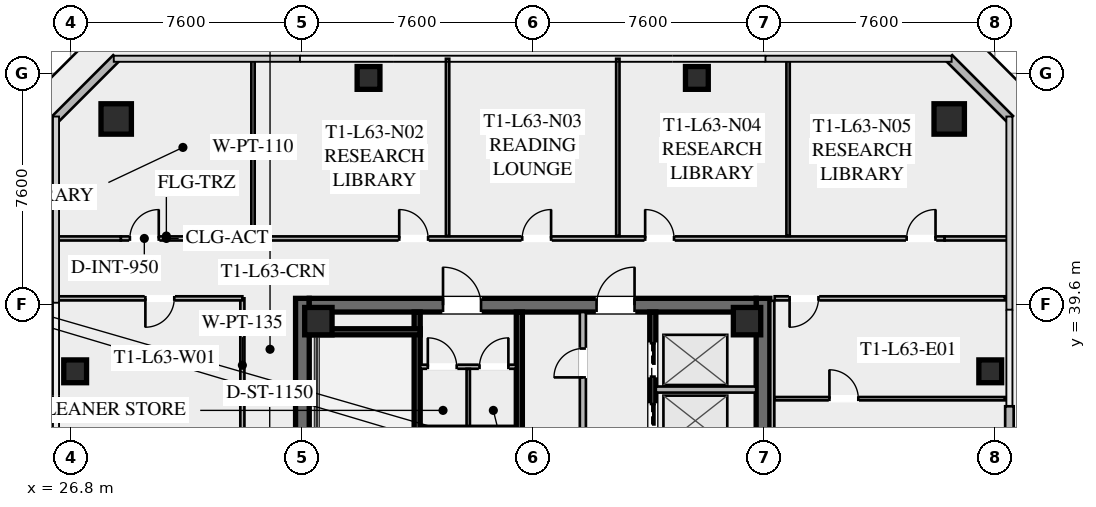
"""IFC4 building model, lengths in metres.
Left out: names, types, materials, properties, quantities, classifications, styles, units other than length and angle.
Written with IfcOpenShell. Run it as: python <this file> out.ifc"""

import sys

from ifc_helpers import new_model, si_unit, direction, frame, frame_2d, origin, origin_2d, place, context, subcontext, project, spatial, rectangle, hollow_rectangle, extrude, element, fill, save


model = new_model("IFC4")
c1 = context("Model", 3, precision=1e-05, world=origin(), true_north=direction((0.0, 1.0)))
c2 = subcontext(c1, "Body", "Model", "MODEL_VIEW")
j1 = project(units=[si_unit("LENGTHUNIT", "METRE"), si_unit("PLANEANGLEUNIT", "RADIAN")], contexts=[c1])
p1 = place(None, origin())
s1 = spatial("IfcSite", under=j1, at=p1, CompositionType="ELEMENT")
p2 = place(p1, origin())
s2 = spatial("IfcBuilding", under=s1, at=p2, CompositionType="ELEMENT")
p3 = place(p2, frame((0.0, 0.0, 232.6)))
s3 = spatial("IfcBuildingStorey", under=s2, at=p3, CompositionType="ELEMENT", Elevation=232.6)
for number, where, z_axis, x_axis in (
    (1, (34.425, 24.2, 0.0), (0.0, 0.0, 1.0), (0.0, 1.0, 0.0)),
    (2, (49.575, 39.8, 0.0), (0.0, 0.0, 1.0), (0.0, -1.0, 0.0)),
):
    element("IfcWall", number, at=place(p3, frame(where, z_axis=z_axis, x_axis=x_axis)), inside=s3, PredefinedType="SHEAR", context=c2, shape_type="SweptSolid", body=[
        extrude(rectangle(XDim=15.6, YDim=0.45, at=frame_2d((7.8, 0.0))), origin(), (0.0, 0.0, 1.0), 3.55),
    ])
p4 = place(p3, frame((34.65, 39.575, 0.0), z_axis=(0.0, 0.0, 1.0), x_axis=(1.0, 0.0, 0.0)))
e3 = element("IfcWall", 3, at=p4, inside=s3, PredefinedType="SHEAR", context=c2, shape_type="SweptSolid", body=[
    extrude(rectangle(XDim=14.7, YDim=0.45, at=frame_2d((7.35, 0.0))), origin(), (0.0, 0.0, 1.0), 3.55),
])
p5 = place(p4, frame((4.4, 0.0, 0.0)))
e4 = element("IfcOpeningElement", 4, at=p5, cuts=e3, PredefinedType="OPENING", context=c2, shape_type="SweptSolid", body=[
    extrude(rectangle(XDim=1.25, YDim=2.25, at=frame_2d((0.625, 1.125))), frame((0.0, 0.235, 0.0), z_axis=(0.0, -1.0, 0.0), x_axis=(1.0, 0.0, 0.0)), (0.0, 0.0, 1.0), 0.47),
])
p6 = place(p4, frame((9.45, 0.0, 0.0)))
e5 = element("IfcOpeningElement", 5, at=p6, cuts=e3, PredefinedType="OPENING", context=c2, shape_type="SweptSolid", body=[
    extrude(rectangle(XDim=1.25, YDim=2.25, at=frame_2d((0.625, 1.125))), frame((0.0, 0.235, 0.0), z_axis=(0.0, -1.0, 0.0), x_axis=(1.0, 0.0, 0.0)), (0.0, 0.0, 1.0), 0.47),
])
for number, where, z_axis, x_axis in (
    (6, (49.05, 39.05, 0.0), (0.0, 0.0, 1.0), (1.0, 0.0, 0.0)),
    (7, (34.95, 39.05, 0.0), (0.0, 0.0, 1.0), (1.0, 0.0, 0.0)),
):
    element("IfcColumn", number, at=place(p3, frame(where, z_axis=z_axis, x_axis=x_axis)), inside=s3, PredefinedType="COLUMN", context=c2, shape_type="SweptSolid", body=[
        extrude(hollow_rectangle(XDim=0.9, YDim=0.9, WallThickness=0.04, at=origin_2d()), origin(), (0.0, 0.0, 1.0), 3.37),
    ])
for number, where, z_axis, x_axis in (
    (8, (55.7, 45.7, -0.175), (0.0, 0.0, 1.0), (1.0, 0.0, 0.0)),
    (9, (28.3, 45.7, -0.175), (0.0, 0.0, 1.0), (1.0, 0.0, 0.0)),
):
    element("IfcColumn", number, at=place(p3, frame(where, z_axis=z_axis, x_axis=x_axis)), inside=s3, PredefinedType="COLUMN", context=c2, shape_type="SweptSolid", body=[
        extrude(hollow_rectangle(XDim=1.0, YDim=1.0, WallThickness=0.04, at=origin_2d()), origin(), (0.0, 0.0, 1.0), 3.545),
    ])
for number, where, z_axis, x_axis in (
    (10, (57.05, 37.4, -0.175), (0.0, 0.0, 1.0), (1.0, 0.0, 0.0)),
    (11, (47.4, 47.05, -0.175), (0.0, 0.0, 1.0), (1.0, 0.0, 0.0)),
    (12, (36.6, 47.05, -0.175), (0.0, 0.0, 1.0), (1.0, 0.0, 0.0)),
    (13, (26.95, 37.4, -0.175), (0.0, 0.0, 1.0), (1.0, 0.0, 0.0)),
):
    element("IfcColumn", number, at=place(p3, frame(where, z_axis=z_axis, x_axis=x_axis)), inside=s3, PredefinedType="COLUMN", context=c2, shape_type="SweptSolid", body=[
        extrude(hollow_rectangle(XDim=0.75, YDim=0.75, WallThickness=0.032, at=origin_2d()), origin(), (0.0, 0.0, 1.0), 3.545),
    ])
p7 = place(p3, frame((57.68, 36.25, 0.0), z_axis=(0.0, 0.0, 1.0), x_axis=(0.0, -1.0, 0.0)))
e14 = element("IfcWall", 14, at=p7, inside=s3, PredefinedType="SOLIDWALL", context=c2, shape_type="SweptSolid", body=[
    extrude(rectangle(XDim=8.5, YDim=0.28, at=frame_2d((4.25, 0.0))), origin(), (0.0, 0.0, 1.0), 3.37),
])
p8 = place(p7, frame((3.6, 0.0, 0.0)))
e15 = element("IfcOpeningElement", 15, at=p8, cuts=e14, PredefinedType="OPENING", context=c2, shape_type="SweptSolid", body=[
    extrude(rectangle(XDim=1.3, YDim=2.15, at=frame_2d((0.65, 1.075))), frame((0.0, 0.15, 0.0), z_axis=(0.0, -1.0, 0.0), x_axis=(1.0, 0.0, 0.0)), (0.0, 0.0, 1.0), 0.3),
])
p9 = place(p7, frame((1.46, 0.0, 0.85)))
e16 = element("IfcOpeningElement", 16, at=p9, cuts=e14, PredefinedType="OPENING", context=c2, shape_type="SweptSolid", body=[
    extrude(rectangle(XDim=1.8, YDim=1.92, at=frame_2d((0.9, 0.96))), frame((0.0, 0.15, 0.0), z_axis=(0.0, -1.0, 0.0), x_axis=(1.0, 0.0, 0.0)), (0.0, 0.0, 1.0), 0.3),
])
for number, where, z_axis, x_axis in (
    (17, (26.3, 45.7, 0.0), (0.0, 0.0, 1.0), (0.707, 0.707, 0.0)),
    (18, (55.7, 47.7, 0.0), (0.0, 0.0, 1.0), (0.707, -0.707, 0.0)),
):
    element("IfcWall", number, at=place(p3, frame(where, z_axis=z_axis, x_axis=x_axis)), inside=s3, PredefinedType="SOLIDWALL", context=c2, shape_type="SweptSolid", body=[
        extrude(rectangle(XDim=2.828, YDim=0.28, at=frame_2d((1.414, 0.0))), origin(), (0.0, 0.0, 1.0), 3.37),
    ])
p10 = place(p3, frame((38.2, 31.2, 0.0), z_axis=(0.0, 0.0, 1.0), x_axis=(0.0, 1.0, 0.0)))
e19 = element("IfcWall", 19, at=p10, inside=s3, PredefinedType="SHEAR", context=c2, shape_type="SweptSolid", body=[
    extrude(rectangle(XDim=8.15, YDim=0.2, at=frame_2d((4.075, 0.0))), origin(), (0.0, 0.0, 1.0), 3.37),
])
p11 = place(p10, frame((0.45, 0.0, 0.0)))
e20 = element("IfcOpeningElement", 20, at=p11, cuts=e19, PredefinedType="OPENING", context=c2, shape_type="SweptSolid", body=[
    extrude(rectangle(XDim=1.15, YDim=2.2, at=frame_2d((0.575, 1.1))), frame((0.0, 0.11, 0.0), z_axis=(0.0, -1.0, 0.0), x_axis=(1.0, 0.0, 0.0)), (0.0, 0.0, 1.0), 0.22),
])
p12 = place(p3, frame((34.65, 38.7, 0.0), z_axis=(0.0, 0.0, 1.0), x_axis=(1.0, 0.0, 0.0)))
e21 = element("IfcWall", 21, at=p12, inside=s3, PredefinedType="SHEAR", context=c2, shape_type="SweptSolid", body=[
    extrude(rectangle(XDim=3.65, YDim=0.2, at=frame_2d((1.825, 0.0))), origin(), (0.0, 0.0, 1.0), 3.37),
])
p13 = place(p3, frame((41.56, 24.65, 0.0), z_axis=(0.0, 0.0, 1.0), x_axis=(0.0, 1.0, 0.0)))
e22 = element("IfcWall", 22, at=p13, inside=s3, PredefinedType="SHEAR", context=c2, shape_type="SweptSolid", body=[
    extrude(rectangle(XDim=14.7, YDim=0.2, at=frame_2d((7.35, 0.0))), origin(), (0.0, 0.0, 1.0), 3.37),
])
p14 = place(p3, frame((45.95, 39.35, 0.0), z_axis=(0.0, 0.0, 1.0), x_axis=(0.0, -1.0, 0.0)))
e23 = element("IfcWall", 23, at=p14, inside=s3, PredefinedType="SHEAR", context=c2, shape_type="SweptSolid", body=[
    extrude(rectangle(XDim=6.55, YDim=0.2, at=frame_2d((3.275, 0.0))), origin(), (0.0, 0.0, 1.0), 3.37),
])
p15 = place(p14, frame((5.075, 0.0, 0.0)))
e24 = element("IfcOpeningElement", 24, at=p15, cuts=e23, PredefinedType="OPENING", context=c2, shape_type="SweptSolid", body=[
    extrude(rectangle(XDim=1.1, YDim=2.2, at=frame_2d((0.55, 1.1))), frame((0.0, 0.11, 0.0), z_axis=(0.0, -1.0, 0.0), x_axis=(1.0, 0.0, 0.0)), (0.0, 0.0, 1.0), 0.22),
])
p16 = place(p14, frame((3.025, 0.0, 0.0)))
e25 = element("IfcOpeningElement", 25, at=p16, cuts=e23, PredefinedType="OPENING", context=c2, shape_type="SweptSolid", body=[
    extrude(rectangle(XDim=1.1, YDim=2.2, at=frame_2d((0.55, 1.1))), frame((0.0, 0.11, 0.0), z_axis=(0.0, -1.0, 0.0), x_axis=(1.0, 0.0, 0.0)), (0.0, 0.0, 1.0), 0.22),
])
p17 = place(p14, frame((1.025, 0.0, 0.0)))
e26 = element("IfcOpeningElement", 26, at=p17, cuts=e23, PredefinedType="OPENING", context=c2, shape_type="SweptSolid", body=[
    extrude(rectangle(XDim=1.1, YDim=2.2, at=frame_2d((0.55, 1.1))), frame((0.0, 0.11, 0.0), z_axis=(0.0, -1.0, 0.0), x_axis=(1.0, 0.0, 0.0)), (0.0, 0.0, 1.0), 0.22),
])
p18 = place(p3, frame((46.05, 36.8, 0.0), z_axis=(0.0, 0.0, 1.0), x_axis=(1.0, 0.0, 0.0)))
e27 = element("IfcWall", 27, at=p18, inside=s3, PredefinedType="SOLIDWALL", context=c2, shape_type="SweptSolid", body=[
    extrude(rectangle(XDim=3.3, YDim=0.2, at=frame_2d((1.65, 0.0))), origin(), (0.0, 0.0, 1.0), 3.37),
])
p19 = place(p3, frame((38.3, 37.55, 0.0), z_axis=(0.0, 0.0, 1.0), x_axis=(1.0, 0.0, 0.0)))
e28 = element("IfcWall", 28, at=p19, inside=s3, PredefinedType="PARTITIONING", context=c2, shape_type="SweptSolid", body=[
    extrude(rectangle(XDim=3.15, YDim=0.135, at=frame_2d((1.575, 0.0))), origin(), (0.0, 0.0, 1.0), 2.723),
])
p20 = place(p19, frame((0.25, 0.0, 0.0)))
e29 = element("IfcOpeningElement", 29, at=p20, cuts=e28, PredefinedType="OPENING", context=c2, shape_type="SweptSolid", body=[
    extrude(rectangle(XDim=0.95, YDim=2.05, at=frame_2d((0.475, 1.025))), frame((0.0, 0.077, 0.0), z_axis=(0.0, -1.0, 0.0), x_axis=(1.0, 0.0, 0.0)), (0.0, 0.0, 1.0), 0.155),
])
p21 = place(p19, frame((1.95, 0.0, 0.0)))
e30 = element("IfcOpeningElement", 30, at=p21, cuts=e28, PredefinedType="OPENING", context=c2, shape_type="SweptSolid", body=[
    extrude(rectangle(XDim=0.95, YDim=2.05, at=frame_2d((0.475, 1.025))), frame((0.0, 0.077, 0.0), z_axis=(0.0, -1.0, 0.0), x_axis=(1.0, 0.0, 0.0)), (0.0, 0.0, 1.0), 0.155),
])
p22 = place(p3, frame((39.88, 33.68, 0.0), z_axis=(0.0, 0.0, 1.0), x_axis=(0.0, 1.0, 0.0)))
e31 = element("IfcWall", 31, at=p22, inside=s3, PredefinedType="PARTITIONING", context=c2, shape_type="SweptSolid", body=[
    extrude(rectangle(XDim=3.8, YDim=0.11, at=frame_2d((1.9, 0.0))), origin(), (0.0, 0.0, 1.0), 2.723),
])
p23 = place(p3, frame((38.3, 35.55, 0.0), z_axis=(0.0, 0.0, 1.0), x_axis=(1.0, 0.0, 0.0)))
e32 = element("IfcWall", 32, at=p23, inside=s3, PredefinedType="PARTITIONING", context=c2, shape_type="SweptSolid", body=[
    extrude(rectangle(XDim=3.15, YDim=0.11, at=frame_2d((1.575, 0.0))), origin(), (0.0, 0.0, 1.0), 2.723),
])
p24 = place(p3, frame((43.65, 32.35, 0.0), z_axis=(0.0, 0.0, 1.0), x_axis=(0.0, 1.0, 0.0)))
e33 = element("IfcWall", 33, at=p24, inside=s3, PredefinedType="SOLIDWALL", context=c2, shape_type="SweptSolid", body=[
    extrude(rectangle(XDim=7.0, YDim=0.2, at=frame_2d((3.5, 0.0))), origin(), (0.0, 0.0, 1.0), 2.723),
])
p25 = place(p24, frame((0.85, 0.0, 0.0)))
e34 = element("IfcOpeningElement", 34, at=p25, cuts=e33, PredefinedType="OPENING", context=c2, shape_type="SweptSolid", body=[
    extrude(rectangle(XDim=0.95, YDim=2.05, at=frame_2d((0.475, 1.025))), frame((0.0, 0.11, 0.0), z_axis=(0.0, -1.0, 0.0), x_axis=(1.0, 0.0, 0.0)), (0.0, 0.0, 1.0), 0.22),
])
p26 = place(p24, frame((4.85, 0.0, 0.0)))
e35 = element("IfcOpeningElement", 35, at=p26, cuts=e33, PredefinedType="OPENING", context=c2, shape_type="SweptSolid", body=[
    extrude(rectangle(XDim=0.95, YDim=2.05, at=frame_2d((0.475, 1.025))), frame((0.0, 0.11, 0.0), z_axis=(0.0, -1.0, 0.0), x_axis=(1.0, 0.0, 0.0)), (0.0, 0.0, 1.0), 0.22),
])
p27 = place(p3, frame((32.45, 35.4, 0.0), z_axis=(0.0, 0.0, 1.0), x_axis=(0.0, 1.0, 0.0)))
e36 = element("IfcWall", 36, at=p27, inside=s3, PredefinedType="PARTITIONING", context=c2, shape_type="SweptSolid", body=[
    extrude(rectangle(XDim=4.4, YDim=0.135, at=frame_2d((2.2, 0.0))), origin(), (0.0, 0.0, 1.0), 2.723),
])
p28 = place(p3, frame((28.45, 41.77, 0.0), z_axis=(0.0, 0.0, 1.0), x_axis=(1.0, 0.0, 0.0)))
e37 = element("IfcWall", 37, at=p28, inside=s3, PredefinedType="PARTITIONING", context=c2, shape_type="SweptSolid", body=[
    extrude(rectangle(XDim=27.1, YDim=0.135, at=frame_2d((13.55, 0.0))), origin(), (0.0, 0.0, 1.0), 2.723),
])
p29 = place(p28, frame((0.3, 0.0, 0.0)))
e38 = element("IfcOpeningElement", 38, at=p29, cuts=e37, PredefinedType="OPENING", context=c2, shape_type="SweptSolid", body=[
    extrude(rectangle(XDim=0.95, YDim=2.05, at=frame_2d((0.475, 1.025))), frame((0.0, 0.077, 0.0), z_axis=(0.0, -1.0, 0.0), x_axis=(1.0, 0.0, 0.0)), (0.0, 0.0, 1.0), 0.155),
])
p30 = place(p28, frame((9.159, 0.0, 0.0)))
e39 = element("IfcOpeningElement", 39, at=p30, cuts=e37, PredefinedType="OPENING", context=c2, shape_type="SweptSolid", body=[
    extrude(rectangle(XDim=0.95, YDim=2.05, at=frame_2d((0.475, 1.025))), frame((0.0, 0.077, 0.0), z_axis=(0.0, -1.0, 0.0), x_axis=(1.0, 0.0, 0.0)), (0.0, 0.0, 1.0), 0.155),
])
p31 = place(p28, frame((13.205, 0.0, 0.0)))
e40 = element("IfcOpeningElement", 40, at=p31, cuts=e37, PredefinedType="OPENING", context=c2, shape_type="SweptSolid", body=[
    extrude(rectangle(XDim=0.95, YDim=2.05, at=frame_2d((0.475, 1.025))), frame((0.0, 0.077, 0.0), z_axis=(0.0, -1.0, 0.0), x_axis=(1.0, 0.0, 0.0)), (0.0, 0.0, 1.0), 0.155),
])
p32 = place(p28, frame((17.249, 0.0, 0.0)))
e41 = element("IfcOpeningElement", 41, at=p32, cuts=e37, PredefinedType="OPENING", context=c2, shape_type="SweptSolid", body=[
    extrude(rectangle(XDim=0.95, YDim=2.05, at=frame_2d((0.475, 1.025))), frame((0.0, 0.077, 0.0), z_axis=(0.0, -1.0, 0.0), x_axis=(1.0, 0.0, 0.0)), (0.0, 0.0, 1.0), 0.155),
])
p33 = place(p28, frame((25.85, 0.0, 0.0)))
e42 = element("IfcOpeningElement", 42, at=p33, cuts=e37, PredefinedType="OPENING", context=c2, shape_type="SweptSolid", body=[
    extrude(rectangle(XDim=0.95, YDim=2.05, at=frame_2d((0.475, 1.025))), frame((0.0, 0.077, 0.0), z_axis=(0.0, -1.0, 0.0), x_axis=(1.0, 0.0, 0.0)), (0.0, 0.0, 1.0), 0.155),
])
for number, where, z_axis, x_axis in (
    (43, (26.32, 41.77, 0.0), (0.0, 0.0, 1.0), (1.0, 0.0, 0.0)),
    (44, (55.55, 41.77, 0.0), (0.0, 0.0, 1.0), (1.0, 0.0, 0.0)),
):
    element("IfcWall", number, at=place(p3, frame(where, z_axis=z_axis, x_axis=x_axis)), inside=s3, PredefinedType="PARTITIONING", context=c2, shape_type="SweptSolid", body=[
        extrude(rectangle(XDim=2.13, YDim=0.135, at=frame_2d((1.065, 0.0))), origin(), (0.0, 0.0, 1.0), 2.723),
    ])
for number, where, z_axis, x_axis in (
    (45, (32.8, 41.85, 0.0), (0.0, 0.0, 1.0), (0.0, 1.0, 0.0)),
    (46, (39.2, 41.85, 0.0), (0.0, 0.0, 1.0), (0.0, 1.0, 0.0)),
    (47, (44.8, 41.85, 0.0), (0.0, 0.0, 1.0), (0.0, 1.0, 0.0)),
    (48, (50.4, 41.85, 0.0), (0.0, 0.0, 1.0), (0.0, 1.0, 0.0)),
):
    element("IfcWall", number, at=place(p3, frame(where, z_axis=z_axis, x_axis=x_axis)), inside=s3, PredefinedType="PARTITIONING", context=c2, shape_type="SweptSolid", body=[
        extrude(rectangle(XDim=5.83, YDim=0.11, at=frame_2d((2.915, 0.0))), origin(), (0.0, 0.0, 1.0), 2.723),
    ])
p34 = place(p3, frame((49.88, 39.72, 0.0), z_axis=(0.0, 0.0, 1.0), x_axis=(0.0, -1.0, 0.0)))
e49 = element("IfcWall", 49, at=p34, inside=s3, PredefinedType="PARTITIONING", context=c2, shape_type="SweptSolid", body=[
    extrude(rectangle(XDim=15.44, YDim=0.135, at=frame_2d((7.72, 0.0))), origin(), (0.0, 0.0, 1.0), 2.723),
])
p35 = place(p3, frame((57.53, 39.8, 0.0), z_axis=(0.0, 0.0, 1.0), x_axis=(-1.0, 0.0, 0.0)))
e50 = element("IfcWall", 50, at=p35, inside=s3, PredefinedType="PARTITIONING", context=c2, shape_type="SweptSolid", body=[
    extrude(rectangle(XDim=7.57, YDim=0.135, at=frame_2d((3.785, 0.0))), origin(), (0.0, 0.0, 1.0), 2.723),
])
p36 = place(p35, frame((6.13, 0.0, 0.0)))
e51 = element("IfcOpeningElement", 51, at=p36, cuts=e50, PredefinedType="OPENING", context=c2, shape_type="SweptSolid", body=[
    extrude(rectangle(XDim=0.95, YDim=2.05, at=frame_2d((0.475, 1.025))), frame((0.0, 0.077, 0.0), z_axis=(0.0, -1.0, 0.0), x_axis=(1.0, 0.0, 0.0)), (0.0, 0.0, 1.0), 0.155),
])
p37 = place(p3, frame((49.96, 36.5, 0.0), z_axis=(0.0, 0.0, 1.0), x_axis=(1.0, 0.0, 0.0)))
e52 = element("IfcWall", 52, at=p37, inside=s3, PredefinedType="PARTITIONING", context=c2, shape_type="SweptSolid", body=[
    extrude(rectangle(XDim=7.57, YDim=0.11, at=frame_2d((3.785, 0.0))), origin(), (0.0, 0.0, 1.0), 2.723),
])
p38 = place(p37, frame((1.8, 0.0, 0.0)))
e53 = element("IfcOpeningElement", 53, at=p38, cuts=e52, PredefinedType="OPENING", context=c2, shape_type="SweptSolid", body=[
    extrude(rectangle(XDim=0.95, YDim=2.05, at=frame_2d((0.475, 1.025))), frame((0.0, 0.065, 0.0), z_axis=(0.0, -1.0, 0.0), x_axis=(1.0, 0.0, 0.0)), (0.0, 0.0, 1.0), 0.13),
])
p39 = place(p3, frame((32.45, 39.8, 0.0), z_axis=(0.0, 0.0, 1.0), x_axis=(-1.0, 0.0, 0.0)))
e54 = element("IfcWall", 54, at=p39, inside=s3, PredefinedType="PARTITIONING", context=c2, shape_type="SweptSolid", body=[
    extrude(rectangle(XDim=6.13, YDim=0.135, at=frame_2d((3.065, 0.0))), origin(), (0.0, 0.0, 1.0), 2.723),
])
p40 = place(p39, frame((2.24, 0.0, 0.0)))
e55 = element("IfcOpeningElement", 55, at=p40, cuts=e54, PredefinedType="OPENING", context=c2, shape_type="SweptSolid", body=[
    extrude(rectangle(XDim=0.95, YDim=2.05, at=frame_2d((0.475, 1.025))), frame((0.0, 0.077, 0.0), z_axis=(0.0, -1.0, 0.0), x_axis=(1.0, 0.0, 0.0)), (0.0, 0.0, 1.0), 0.155),
])
p41 = place(p5, origin())
e56 = element("IfcDoor", 56, at=p41, inside=s3, OperationType="SINGLE_SWING_LEFT", PredefinedType="DOOR", context=c2, shape_type="SweptSolid", body=[
    extrude(rectangle(XDim=1.25, YDim=2.25, at=frame_2d((0.625, 1.125))), frame((0.0, 0.025, 0.0), z_axis=(0.0, -1.0, 0.0), x_axis=(1.0, 0.0, 0.0)), (0.0, 0.0, 1.0), 0.05),
])
fill(e4, e56)
p42 = place(p6, origin())
e57 = element("IfcDoor", 57, at=p42, inside=s3, OperationType="SINGLE_SWING_RIGHT", PredefinedType="DOOR", context=c2, shape_type="SweptSolid", body=[
    extrude(rectangle(XDim=1.25, YDim=2.25, at=frame_2d((0.625, 1.125))), frame((0.0, 0.025, 0.0), z_axis=(0.0, -1.0, 0.0), x_axis=(1.0, 0.0, 0.0)), (0.0, 0.0, 1.0), 0.05),
])
fill(e5, e57)
p43 = place(p20, origin())
e58 = element("IfcDoor", 58, at=p43, inside=s3, OperationType="SINGLE_SWING_LEFT", PredefinedType="DOOR", context=c2, shape_type="SweptSolid", body=[
    extrude(rectangle(XDim=0.95, YDim=2.05, at=frame_2d((0.475, 1.025))), frame((0.0, 0.025, 0.0), z_axis=(0.0, -1.0, 0.0), x_axis=(1.0, 0.0, 0.0)), (0.0, 0.0, 1.0), 0.05),
])
fill(e29, e58)
p44 = place(p21, origin())
e59 = element("IfcDoor", 59, at=p44, inside=s3, OperationType="SINGLE_SWING_RIGHT", PredefinedType="DOOR", context=c2, shape_type="SweptSolid", body=[
    extrude(rectangle(XDim=0.95, YDim=2.05, at=frame_2d((0.475, 1.025))), frame((0.0, 0.025, 0.0), z_axis=(0.0, -1.0, 0.0), x_axis=(1.0, 0.0, 0.0)), (0.0, 0.0, 1.0), 0.05),
])
fill(e30, e59)
p45 = place(p26, origin())
e60 = element("IfcDoor", 60, at=p45, inside=s3, OperationType="SINGLE_SWING_LEFT", PredefinedType="DOOR", context=c2, shape_type="SweptSolid", body=[
    extrude(rectangle(XDim=0.95, YDim=2.05, at=frame_2d((0.475, 1.025))), frame((0.0, 0.025, 0.0), z_axis=(0.0, -1.0, 0.0), x_axis=(1.0, 0.0, 0.0)), (0.0, 0.0, 1.0), 0.05),
])
fill(e35, e60)
p46 = place(p29, origin())
e61 = element("IfcDoor", 61, at=p46, inside=s3, OperationType="SINGLE_SWING_RIGHT", PredefinedType="DOOR", context=c2, shape_type="SweptSolid", body=[
    extrude(rectangle(XDim=0.95, YDim=2.05, at=frame_2d((0.475, 1.025))), frame((0.0, 0.025, 0.0), z_axis=(0.0, -1.0, 0.0), x_axis=(1.0, 0.0, 0.0)), (0.0, 0.0, 1.0), 0.05),
])
fill(e38, e61)
p47 = place(p30, origin())
e62 = element("IfcDoor", 62, at=p47, inside=s3, OperationType="SINGLE_SWING_LEFT", PredefinedType="DOOR", context=c2, shape_type="SweptSolid", body=[
    extrude(rectangle(XDim=0.95, YDim=2.05, at=frame_2d((0.475, 1.025))), frame((0.0, 0.025, 0.0), z_axis=(0.0, -1.0, 0.0), x_axis=(1.0, 0.0, 0.0)), (0.0, 0.0, 1.0), 0.05),
])
fill(e39, e62)
p48 = place(p31, origin())
e63 = element("IfcDoor", 63, at=p48, inside=s3, OperationType="SINGLE_SWING_RIGHT", PredefinedType="DOOR", context=c2, shape_type="SweptSolid", body=[
    extrude(rectangle(XDim=0.95, YDim=2.05, at=frame_2d((0.475, 1.025))), frame((0.0, 0.025, 0.0), z_axis=(0.0, -1.0, 0.0), x_axis=(1.0, 0.0, 0.0)), (0.0, 0.0, 1.0), 0.05),
])
fill(e40, e63)
p49 = place(p32, origin())
e64 = element("IfcDoor", 64, at=p49, inside=s3, OperationType="SINGLE_SWING_LEFT", PredefinedType="DOOR", context=c2, shape_type="SweptSolid", body=[
    extrude(rectangle(XDim=0.95, YDim=2.05, at=frame_2d((0.475, 1.025))), frame((0.0, 0.025, 0.0), z_axis=(0.0, -1.0, 0.0), x_axis=(1.0, 0.0, 0.0)), (0.0, 0.0, 1.0), 0.05),
])
fill(e41, e64)
p50 = place(p33, origin())
e65 = element("IfcDoor", 65, at=p50, inside=s3, OperationType="SINGLE_SWING_RIGHT", PredefinedType="DOOR", context=c2, shape_type="SweptSolid", body=[
    extrude(rectangle(XDim=0.95, YDim=2.05, at=frame_2d((0.475, 1.025))), frame((0.0, 0.025, 0.0), z_axis=(0.0, -1.0, 0.0), x_axis=(1.0, 0.0, 0.0)), (0.0, 0.0, 1.0), 0.05),
])
fill(e42, e65)
p51 = place(p36, origin())
e66 = element("IfcDoor", 66, at=p51, inside=s3, OperationType="SINGLE_SWING_RIGHT", PredefinedType="DOOR", context=c2, shape_type="SweptSolid", body=[
    extrude(rectangle(XDim=0.95, YDim=2.05, at=frame_2d((0.475, 1.025))), frame((0.0, 0.025, 0.0), z_axis=(0.0, -1.0, 0.0), x_axis=(1.0, 0.0, 0.0)), (0.0, 0.0, 1.0), 0.05),
])
fill(e51, e66)
p52 = place(p38, origin())
e67 = element("IfcDoor", 67, at=p52, inside=s3, OperationType="SINGLE_SWING_LEFT", PredefinedType="DOOR", context=c2, shape_type="SweptSolid", body=[
    extrude(rectangle(XDim=0.95, YDim=2.05, at=frame_2d((0.475, 1.025))), frame((0.0, 0.025, 0.0), z_axis=(0.0, -1.0, 0.0), x_axis=(1.0, 0.0, 0.0)), (0.0, 0.0, 1.0), 0.05),
])
fill(e53, e67)
p53 = place(p40, origin())
e68 = element("IfcDoor", 68, at=p53, inside=s3, OperationType="SINGLE_SWING_RIGHT", PredefinedType="DOOR", context=c2, shape_type="SweptSolid", body=[
    extrude(rectangle(XDim=0.95, YDim=2.05, at=frame_2d((0.475, 1.025))), frame((0.0, 0.025, 0.0), z_axis=(0.0, -1.0, 0.0), x_axis=(1.0, 0.0, 0.0)), (0.0, 0.0, 1.0), 0.05),
])
fill(e55, e68)
p54 = place(p16, origin())
e69 = element("IfcDoor", 69, at=p54, inside=s3, OperationType="SLIDING_TO_LEFT", PredefinedType="DOOR", context=c2, shape_type="SweptSolid", body=[
    extrude(rectangle(XDim=1.1, YDim=2.2, at=frame_2d((0.55, 1.1))), frame((0.0, 0.025, 0.0), z_axis=(0.0, -1.0, 0.0), x_axis=(1.0, 0.0, 0.0)), (0.0, 0.0, 1.0), 0.05),
])
fill(e25, e69)
p55 = place(p17, origin())
e70 = element("IfcDoor", 70, at=p55, inside=s3, OperationType="SLIDING_TO_LEFT", PredefinedType="DOOR", context=c2, shape_type="SweptSolid", body=[
    extrude(rectangle(XDim=1.1, YDim=2.2, at=frame_2d((0.55, 1.1))), frame((0.0, 0.025, 0.0), z_axis=(0.0, -1.0, 0.0), x_axis=(1.0, 0.0, 0.0)), (0.0, 0.0, 1.0), 0.05),
])
fill(e26, e70)
save(model, sys.argv[1])
